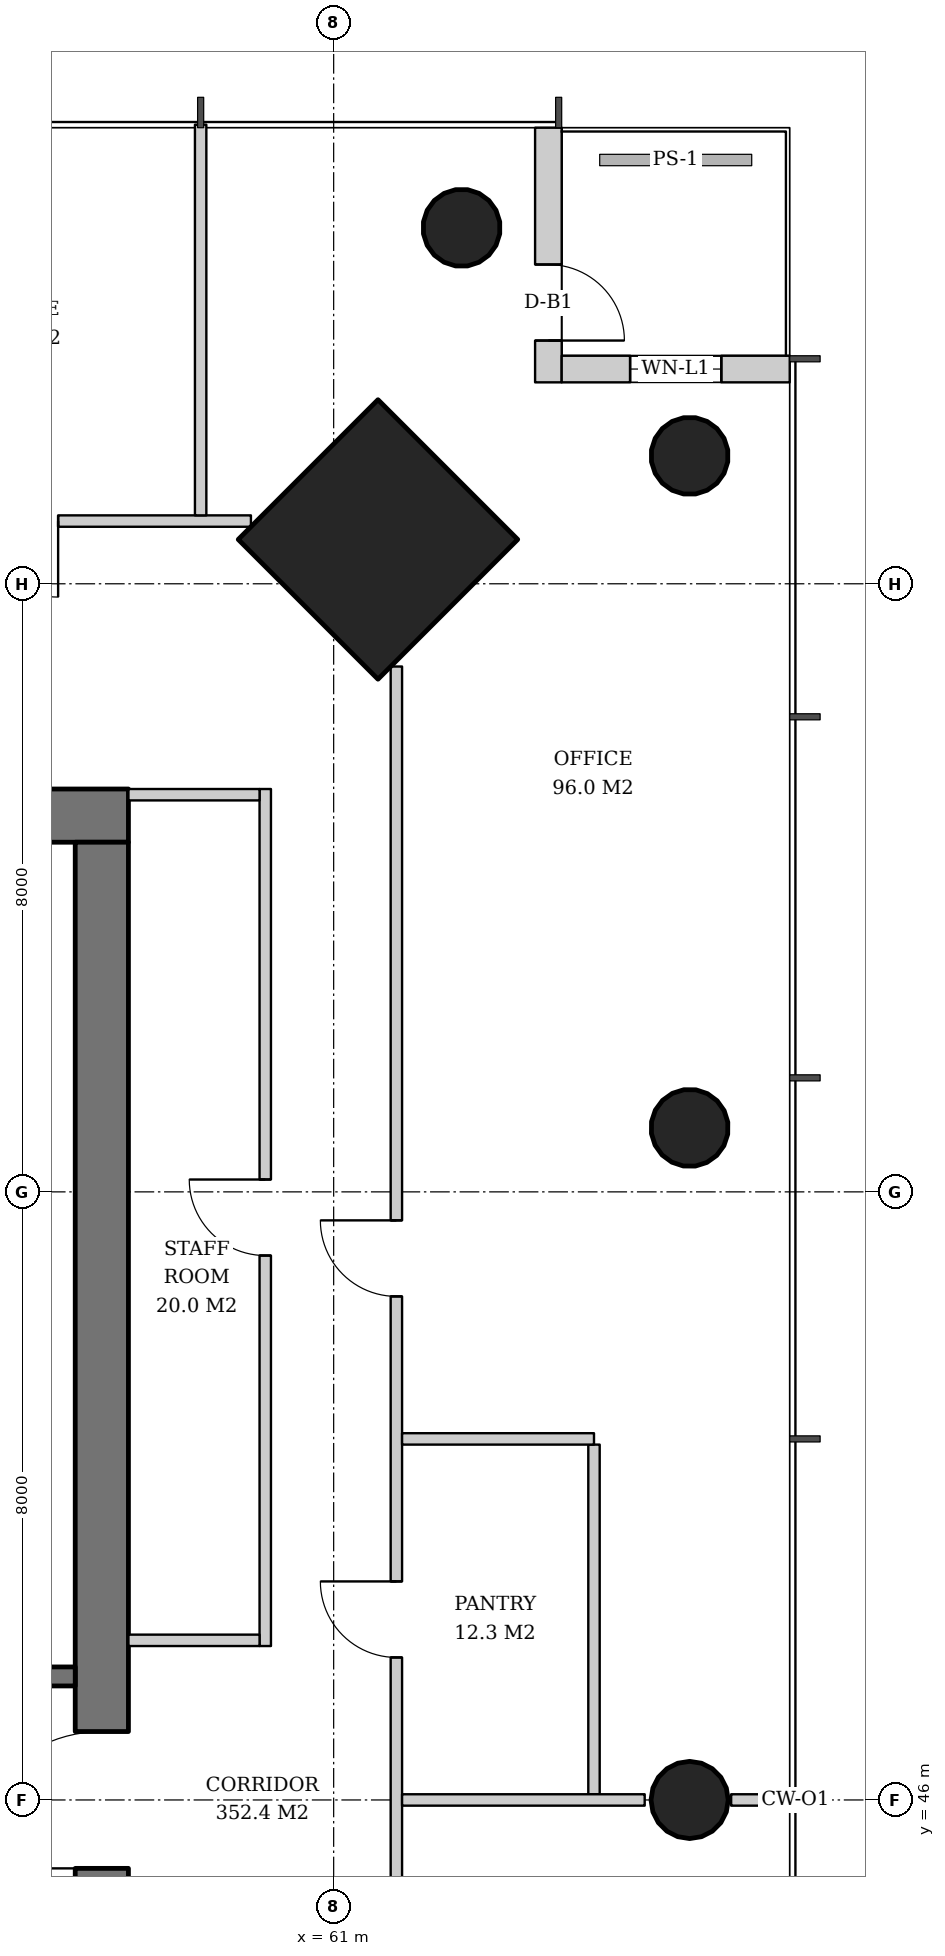
"""IFC4 building model, lengths in metres.
Left out: names, types, materials, properties, quantities, classifications, styles, units other than length and angle.
Written with IfcOpenShell. Run it as: python <this file> out.ifc"""

import sys

from ifc_helpers import new_model, si_unit, direction, frame, frame_2d, origin, origin_2d, place, context, subcontext, project, spatial, rectangle, hollow_circle, extrude, element, fill, save


model = new_model("IFC4")
c1 = context("Model", 3, precision=1e-05, world=origin(), true_north=direction((0.0, 1.0)))
c2 = subcontext(c1, "Body", "Model", "MODEL_VIEW")
j1 = project(units=[si_unit("LENGTHUNIT", "METRE"), si_unit("PLANEANGLEUNIT", "RADIAN")], contexts=[c1])
p1 = place(None, origin())
s1 = spatial("IfcSite", under=j1, at=p1, CompositionType="ELEMENT")
p2 = place(p1, origin())
s2 = spatial("IfcBuilding", under=s1, at=p2, CompositionType="ELEMENT")
p3 = place(p2, frame((0.0, 0.0, 123.6)))
s3 = spatial("IfcBuildingStorey", under=s2, at=p3, CompositionType="ELEMENT", Elevation=123.6)
p4 = place(p3, frame((61.621, 62.621, 0.0), z_axis=(-0.031900153262, -0.031900153262, 0.998981861919), x_axis=(0.707106781187, -0.707106781187, 0.0)))
e1 = element("IfcColumn", 1, at=p4, inside=s3, PredefinedType="COLUMN", context=c2, shape_type="SweptSolid", body=[
    extrude(rectangle(XDim=2.6, YDim=2.6, at=origin_2d()), origin(), (0.0, 0.0, 1.0), 3.804),
])
p5 = place(p3, frame((65.721, 63.721, 0.0), z_axis=(-0.031900153262, -0.031900153262, 0.998981861919), x_axis=(0.707106781187, -0.707106781187, 0.0)))
e2 = element("IfcColumn", 2, at=p5, inside=s3, PredefinedType="COLUMN", context=c2, shape_type="SweptSolid", body=[
    extrude(hollow_circle(Radius=0.508, WallThickness=0.04, at=origin_2d()), origin(), (0.0, 0.0, 1.0), 3.804),
])
p6 = place(p3, frame((65.721, 46.0, 0.0), z_axis=(-0.031916396774, 0.0, 0.999490542035), x_axis=(0.0, -1.0, 0.0)))
e3 = element("IfcColumn", 3, at=p6, inside=s3, PredefinedType="COLUMN", context=c2, shape_type="SweptSolid", body=[
    extrude(hollow_circle(Radius=0.508, WallThickness=0.04, at=origin_2d()), origin(), (0.0, 0.0, 1.0), 3.802),
])
p7 = place(p3, frame((65.721, 54.861, 0.0), z_axis=(-0.031912349901, -0.015924069971, 0.999363810591), x_axis=(0.446493300058, -0.894786976326, 0.0)))
e4 = element("IfcColumn", 4, at=p7, inside=s3, PredefinedType="COLUMN", context=c2, shape_type="SweptSolid", body=[
    extrude(hollow_circle(Radius=0.508, WallThickness=0.04, at=origin_2d()), origin(), (0.0, 0.0, 1.0), 3.802),
])
p8 = place(p3, frame((62.721, 66.721, 0.0), z_axis=(-0.031900153262, -0.031900153262, 0.998981861919), x_axis=(0.707106781187, -0.707106781187, 0.0)))
e5 = element("IfcColumn", 5, at=p8, inside=s3, PredefinedType="COLUMN", context=c2, shape_type="SweptSolid", body=[
    extrude(hollow_circle(Radius=0.508, WallThickness=0.04, at=origin_2d()), origin(), (0.0, 0.0, 1.0), 3.804),
])
p9 = place(p3, frame((31.7, 58.95, 0.0), z_axis=(0.0, 0.0, 1.0), x_axis=(1.0, 0.0, 0.0)))
e6 = element("IfcWall", 6, at=p9, inside=s3, PredefinedType="SHEAR", context=c2, shape_type="SweptSolid", body=[
    extrude(rectangle(XDim=26.6, YDim=0.7, at=frame_2d((13.3, 0.0))), origin(), (0.0, 0.0, 1.0), 3.8),
])
p10 = place(p9, frame((17.94, 0.0, 0.0)))
e7 = element("IfcOpeningElement", 7, at=p10, cuts=e6, PredefinedType="OPENING", context=c2, shape_type="SweptSolid", body=[
    extrude(rectangle(XDim=1.0, YDim=2.1, at=frame_2d((0.5, 1.05))), frame((0.0, 0.36, 0.0), z_axis=(0.0, -1.0, 0.0), x_axis=(1.0, 0.0, 0.0)), (0.0, 0.0, 1.0), 0.72),
])
p11 = place(p9, frame((5.825, 0.0, 0.0)))
e8 = element("IfcOpeningElement", 8, at=p11, cuts=e6, PredefinedType="OPENING", context=c2, shape_type="SweptSolid", body=[
    extrude(rectangle(XDim=1.0, YDim=2.1, at=frame_2d((0.5, 1.05))), frame((0.0, 0.36, 0.0), z_axis=(0.0, -1.0, 0.0), x_axis=(1.0, 0.0, 0.0)), (0.0, 0.0, 1.0), 0.72),
])
p12 = place(p9, frame((1.837, 0.0, 0.0)))
e9 = element("IfcOpeningElement", 9, at=p12, cuts=e6, PredefinedType="OPENING", context=c2, shape_type="SweptSolid", body=[
    extrude(rectangle(XDim=1.0, YDim=2.1, at=frame_2d((0.5, 1.05))), frame((0.0, 0.36, 0.0), z_axis=(0.0, -1.0, 0.0), x_axis=(1.0, 0.0, 0.0)), (0.0, 0.0, 1.0), 0.72),
])
p13 = place(p9, frame((3.781, 0.0, 0.0)))
e10 = element("IfcOpeningElement", 10, at=p13, cuts=e6, PredefinedType="OPENING", context=c2, shape_type="SweptSolid", body=[
    extrude(rectangle(XDim=1.0, YDim=2.1, at=frame_2d((0.5, 1.05))), frame((0.0, 0.36, 0.0), z_axis=(0.0, -1.0, 0.0), x_axis=(1.0, 0.0, 0.0)), (0.0, 0.0, 1.0), 0.72),
])
p14 = place(p9, frame((8.342, 0.0, 0.0)))
e11 = element("IfcOpeningElement", 11, at=p14, cuts=e6, PredefinedType="OPENING", context=c2, shape_type="SweptSolid", body=[
    extrude(rectangle(XDim=1.0, YDim=2.1, at=frame_2d((0.5, 1.05))), frame((0.0, 0.36, 0.0), z_axis=(0.0, -1.0, 0.0), x_axis=(1.0, 0.0, 0.0)), (0.0, 0.0, 1.0), 0.72),
])
p15 = place(p9, frame((11.626, 0.0, 0.0)))
e12 = element("IfcOpeningElement", 12, at=p15, cuts=e6, PredefinedType="OPENING", context=c2, shape_type="SweptSolid", body=[
    extrude(rectangle(XDim=1.0, YDim=2.1, at=frame_2d((0.5, 1.05))), frame((0.0, 0.36, 0.0), z_axis=(0.0, -1.0, 0.0), x_axis=(1.0, 0.0, 0.0)), (0.0, 0.0, 1.0), 0.72),
])
p16 = place(p9, frame((14.862, 0.0, 0.0)))
e13 = element("IfcOpeningElement", 13, at=p16, cuts=e6, PredefinedType="OPENING", context=c2, shape_type="SweptSolid", body=[
    extrude(rectangle(XDim=1.0, YDim=2.1, at=frame_2d((0.5, 1.05))), frame((0.0, 0.36, 0.0), z_axis=(0.0, -1.0, 0.0), x_axis=(1.0, 0.0, 0.0)), (0.0, 0.0, 1.0), 0.72),
])
p17 = place(p9, frame((20.9, 0.0, 0.0)))
e14 = element("IfcOpeningElement", 14, at=p17, cuts=e6, PredefinedType="OPENING", context=c2, shape_type="SweptSolid", body=[
    extrude(rectangle(XDim=1.0, YDim=2.1, at=frame_2d((0.5, 1.05))), frame((0.0, 0.36, 0.0), z_axis=(0.0, -1.0, 0.0), x_axis=(1.0, 0.0, 0.0)), (0.0, 0.0, 1.0), 0.72),
])
p18 = place(p9, frame((23.75, 0.0, 0.0)))
e15 = element("IfcOpeningElement", 15, at=p18, cuts=e6, PredefinedType="OPENING", context=c2, shape_type="SweptSolid", body=[
    extrude(rectangle(XDim=1.0, YDim=2.1, at=frame_2d((0.5, 1.05))), frame((0.0, 0.36, 0.0), z_axis=(0.0, -1.0, 0.0), x_axis=(1.0, 0.0, 0.0)), (0.0, 0.0, 1.0), 0.72),
])
p19 = place(p3, frame((57.95, 33.4, 0.0), z_axis=(0.0, 0.0, 1.0), x_axis=(0.0, 1.0, 0.0)))
e16 = element("IfcWall", 16, at=p19, inside=s3, PredefinedType="SHEAR", context=c2, shape_type="SweptSolid", body=[
    extrude(rectangle(XDim=25.2, YDim=0.7, at=frame_2d((12.6, 0.0))), origin(), (0.0, 0.0, 1.0), 3.8),
])
p20 = place(p19, frame((11.7, 0.0, 0.0)))
e17 = element("IfcOpeningElement", 17, at=p20, cuts=e16, PredefinedType="OPENING", context=c2, shape_type="SweptSolid", body=[
    extrude(rectangle(XDim=1.8, YDim=2.4, at=frame_2d((0.9, 1.2))), frame((0.0, 0.36, 0.0), z_axis=(0.0, -1.0, 0.0), x_axis=(1.0, 0.0, 0.0)), (0.0, 0.0, 1.0), 0.72),
])
p21 = place(p3, frame((63.825, 68.0, 0.0), z_axis=(0.0, 0.0, 1.0), x_axis=(0.0, -1.0, 0.0)))
e18 = element("IfcWall", 18, at=p21, inside=s3, PredefinedType="SOLIDWALL", context=c2, shape_type="SweptSolid", body=[
    extrude(rectangle(XDim=3.35, YDim=0.35, at=frame_2d((1.675, 0.0))), origin(), (0.0, 0.0, 1.0), 3.62),
])
p22 = place(p21, frame((1.8, 0.0, 0.0)))
e19 = element("IfcOpeningElement", 19, at=p22, cuts=e18, PredefinedType="OPENING", context=c2, shape_type="SweptSolid", body=[
    extrude(rectangle(XDim=1.0, YDim=2.4, at=frame_2d((0.5, 1.2))), frame((0.0, 0.185, 0.0), z_axis=(0.0, -1.0, 0.0), x_axis=(1.0, 0.0, 0.0)), (0.0, 0.0, 1.0), 0.37),
])
p23 = place(p3, frame((64.0, 64.825, 0.0), z_axis=(0.0, 0.0, 1.0), x_axis=(1.0, 0.0, 0.0)))
e20 = element("IfcWall", 20, at=p23, inside=s3, PredefinedType="SOLIDWALL", context=c2, shape_type="SweptSolid", body=[
    extrude(rectangle(XDim=3.0, YDim=0.35, at=frame_2d((1.5, 0.0))), origin(), (0.0, 0.0, 1.0), 3.62),
])
p24 = place(p23, frame((0.9, 0.0, 0.6)))
e21 = element("IfcOpeningElement", 21, at=p24, cuts=e20, PredefinedType="OPENING", context=c2, shape_type="SweptSolid", body=[
    extrude(rectangle(XDim=1.2, YDim=2.55, at=frame_2d((0.6, 1.275))), frame((0.0, 0.185, 0.0), z_axis=(0.0, -1.0, 0.0), x_axis=(1.0, 0.0, 0.0)), (0.0, 0.0, 1.0), 0.37),
])
p25 = place(p3, frame((54.9, 47.625, 0.0), z_axis=(0.0, 0.0, 1.0), x_axis=(1.0, 0.0, 0.0)))
e22 = element("IfcWall", 22, at=p25, inside=s3, PredefinedType="SOLIDWALL", context=c2, shape_type="SweptSolid", body=[
    extrude(rectangle(XDim=2.7, YDim=0.25, at=frame_2d((1.35, 0.0))), origin(), (0.0, 0.0, 1.0), 3.62),
])
p26 = place(p3, frame((60.1, 48.025, 0.0), z_axis=(0.0, 0.0, 1.0), x_axis=(0.0, 1.0, 0.0)))
e23 = element("IfcWall", 23, at=p26, inside=s3, PredefinedType="PARTITIONING", context=c2, shape_type="SweptSolid", body=[
    extrude(rectangle(XDim=11.275, YDim=0.15, at=frame_2d((5.638, 0.0))), origin(), (0.0, 0.0, 1.0), 2.806),
])
p27 = place(p26, frame((5.137, 0.0, 0.0)))
e24 = element("IfcOpeningElement", 24, at=p27, cuts=e23, PredefinedType="OPENING", context=c2, shape_type="SweptSolid", body=[
    extrude(rectangle(XDim=1.0, YDim=2.1, at=frame_2d((0.5, 1.05))), frame((0.0, 0.085, 0.0), z_axis=(0.0, -1.0, 0.0), x_axis=(1.0, 0.0, 0.0)), (0.0, 0.0, 1.0), 0.17),
])
for number, where, z_axis, x_axis in (
    (25, (58.3, 48.1, 0.0), (0.0, 0.0, 1.0), (1.0, 0.0, 0.0)),
    (26, (58.3, 59.225, 0.0), (0.0, 0.0, 1.0), (1.0, 0.0, 0.0)),
):
    element("IfcWall", number, at=place(p3, frame(where, z_axis=z_axis, x_axis=x_axis)), inside=s3, PredefinedType="PARTITIONING", context=c2, shape_type="SweptSolid", body=[
        extrude(rectangle(XDim=1.725, YDim=0.15, at=frame_2d((0.862, 0.0))), origin(), (0.0, 0.0, 1.0), 3.62),
    ])
p28 = place(p3, frame((64.425, 46.075, 0.0), z_axis=(0.0, 0.0, 1.0), x_axis=(0.0, 1.0, 0.0)))
e27 = element("IfcWall", 27, at=p28, inside=s3, PredefinedType="PARTITIONING", context=c2, shape_type="SweptSolid", body=[
    extrude(rectangle(XDim=4.6, YDim=0.15, at=frame_2d((2.3, 0.0))), origin(), (0.0, 0.0, 1.0), 2.858),
])
p29 = place(p3, frame((61.825, 31.088, 0.0), z_axis=(0.0, 0.0, 1.0), x_axis=(0.0, 1.0, 0.0)))
e28 = element("IfcWall", 28, at=p29, inside=s3, PredefinedType="PARTITIONING", context=c2, shape_type="SweptSolid", body=[
    extrude(rectangle(XDim=29.823, YDim=0.15, at=frame_2d((14.912, 0.0))), origin(), (0.0, 0.0, 1.0), 2.72),
])
p30 = place(p29, frame((2.537, 0.0, 0.0)))
e29 = element("IfcOpeningElement", 29, at=p30, cuts=e28, PredefinedType="OPENING", context=c2, shape_type="SweptSolid", body=[
    extrude(rectangle(XDim=1.0, YDim=2.1, at=frame_2d((0.5, 1.05))), frame((0.0, 0.085, 0.0), z_axis=(0.0, -1.0, 0.0), x_axis=(1.0, 0.0, 0.0)), (0.0, 0.0, 1.0), 0.17),
])
p31 = place(p29, frame((7.287, 0.0, 0.0)))
e30 = element("IfcOpeningElement", 30, at=p31, cuts=e28, PredefinedType="OPENING", context=c2, shape_type="SweptSolid", body=[
    extrude(rectangle(XDim=1.0, YDim=2.1, at=frame_2d((0.5, 1.05))), frame((0.0, 0.085, 0.0), z_axis=(0.0, -1.0, 0.0), x_axis=(1.0, 0.0, 0.0)), (0.0, 0.0, 1.0), 0.17),
])
p32 = place(p29, frame((12.037, 0.0, 0.0)))
e31 = element("IfcOpeningElement", 31, at=p32, cuts=e28, PredefinedType="OPENING", context=c2, shape_type="SweptSolid", body=[
    extrude(rectangle(XDim=1.0, YDim=2.1, at=frame_2d((0.5, 1.05))), frame((0.0, 0.085, 0.0), z_axis=(0.0, -1.0, 0.0), x_axis=(1.0, 0.0, 0.0)), (0.0, 0.0, 1.0), 0.17),
])
p33 = place(p29, frame((16.787, 0.0, 0.0)))
e32 = element("IfcOpeningElement", 32, at=p33, cuts=e28, PredefinedType="OPENING", context=c2, shape_type="SweptSolid", body=[
    extrude(rectangle(XDim=1.0, YDim=2.1, at=frame_2d((0.5, 1.05))), frame((0.0, 0.085, 0.0), z_axis=(0.0, -1.0, 0.0), x_axis=(1.0, 0.0, 0.0)), (0.0, 0.0, 1.0), 0.17),
])
p34 = place(p29, frame((21.537, 0.0, 0.0)))
e33 = element("IfcOpeningElement", 33, at=p34, cuts=e28, PredefinedType="OPENING", context=c2, shape_type="SweptSolid", body=[
    extrude(rectangle(XDim=1.0, YDim=2.1, at=frame_2d((0.5, 1.05))), frame((0.0, 0.085, 0.0), z_axis=(0.0, -1.0, 0.0), x_axis=(1.0, 0.0, 0.0)), (0.0, 0.0, 1.0), 0.17),
])
p35 = place(p3, frame((61.9, 46.0, 0.0), z_axis=(0.0, 0.0, 1.0), x_axis=(1.0, 0.0, 0.0)))
e34 = element("IfcWall", 34, at=p35, inside=s3, PredefinedType="PARTITIONING", context=c2, shape_type="SweptSolid", body=[
    extrude(rectangle(XDim=3.192, YDim=0.15, at=frame_2d((1.596, 0.0))), origin(), (0.0, 0.0, 1.0), 2.67),
])
p36 = place(p3, frame((66.229, 46.0, 0.0), z_axis=(0.0, 0.0, 1.0), x_axis=(1.0, 0.0, 0.0)))
e35 = element("IfcWall", 35, at=p36, inside=s3, PredefinedType="PARTITIONING", context=c2, shape_type="SweptSolid", body=[
    extrude(rectangle(XDim=0.811, YDim=0.15, at=frame_2d((0.405, 0.0))), origin(), (0.0, 0.0, 1.0), 2.67),
])
p37 = place(p3, frame((61.9, 50.75, 0.0), z_axis=(0.0, 0.0, 1.0), x_axis=(1.0, 0.0, 0.0)))
e36 = element("IfcWall", 36, at=p37, inside=s3, PredefinedType="PARTITIONING", context=c2, shape_type="SweptSolid", body=[
    extrude(rectangle(XDim=2.525, YDim=0.15, at=frame_2d((1.263, 0.0))), origin(), (0.0, 0.0, 1.0), 3.62),
])
p38 = place(p3, frame((59.912, 62.825, 0.0), z_axis=(0.0, 0.0, 1.0), x_axis=(-1.0, 0.0, 0.0)))
e37 = element("IfcWall", 37, at=p38, inside=s3, PredefinedType="PARTITIONING", context=c2, shape_type="SweptSolid", body=[
    extrude(rectangle(XDim=29.823, YDim=0.15, at=frame_2d((14.912, 0.0))), origin(), (0.0, 0.0, 1.0), 2.72),
])
p39 = place(p38, frame((2.537, 0.0, 0.0)))
e38 = element("IfcOpeningElement", 38, at=p39, cuts=e37, PredefinedType="OPENING", context=c2, shape_type="SweptSolid", body=[
    extrude(rectangle(XDim=1.0, YDim=2.1, at=frame_2d((0.5, 1.05))), frame((0.0, 0.085, 0.0), z_axis=(0.0, -1.0, 0.0), x_axis=(1.0, 0.0, 0.0)), (0.0, 0.0, 1.0), 0.17),
])
p40 = place(p38, frame((7.287, 0.0, 0.0)))
e39 = element("IfcOpeningElement", 39, at=p40, cuts=e37, PredefinedType="OPENING", context=c2, shape_type="SweptSolid", body=[
    extrude(rectangle(XDim=1.0, YDim=2.1, at=frame_2d((0.5, 1.05))), frame((0.0, 0.085, 0.0), z_axis=(0.0, -1.0, 0.0), x_axis=(1.0, 0.0, 0.0)), (0.0, 0.0, 1.0), 0.17),
])
p41 = place(p38, frame((12.037, 0.0, 0.0)))
e40 = element("IfcOpeningElement", 40, at=p41, cuts=e37, PredefinedType="OPENING", context=c2, shape_type="SweptSolid", body=[
    extrude(rectangle(XDim=1.0, YDim=2.1, at=frame_2d((0.5, 1.05))), frame((0.0, 0.085, 0.0), z_axis=(0.0, -1.0, 0.0), x_axis=(1.0, 0.0, 0.0)), (0.0, 0.0, 1.0), 0.17),
])
p42 = place(p38, frame((21.537, 0.0, 0.0)))
e41 = element("IfcOpeningElement", 41, at=p42, cuts=e37, PredefinedType="OPENING", context=c2, shape_type="SweptSolid", body=[
    extrude(rectangle(XDim=1.0, YDim=2.1, at=frame_2d((0.5, 1.05))), frame((0.0, 0.085, 0.0), z_axis=(0.0, -1.0, 0.0), x_axis=(1.0, 0.0, 0.0)), (0.0, 0.0, 1.0), 0.17),
])
p43 = place(p3, frame((59.25, 62.9, 0.0), z_axis=(0.0, 0.0, 1.0), x_axis=(0.0, 1.0, 0.0)))
e42 = element("IfcWall", 42, at=p43, inside=s3, PredefinedType="PARTITIONING", context=c2, shape_type="SweptSolid", body=[
    extrude(rectangle(XDim=5.14, YDim=0.15, at=frame_2d((2.57, 0.0))), origin(), (0.0, 0.0, 1.0), 2.82),
])
p44 = place(p22, origin())
e43 = element("IfcDoor", 43, at=p44, inside=s3, OperationType="SINGLE_SWING_RIGHT", PredefinedType="DOOR", context=c2, shape_type="SweptSolid", body=[
    extrude(rectangle(XDim=1.0, YDim=2.4, at=frame_2d((0.5, 1.2))), frame((0.0, 0.025, 0.0), z_axis=(0.0, -1.0, 0.0), x_axis=(1.0, 0.0, 0.0)), (0.0, 0.0, 1.0), 0.05),
])
fill(e19, e43)
p45 = place(p24, origin())
e44 = element("IfcWindow", 44, at=p45, inside=s3, PartitioningType="SINGLE_PANEL", PredefinedType="WINDOW", context=c2, shape_type="SweptSolid", body=[
    extrude(rectangle(XDim=1.2, YDim=2.55, at=frame_2d((0.6, 1.275))), frame((0.0, 0.03, 0.0), z_axis=(0.0, -1.0, 0.0), x_axis=(1.0, 0.0, 0.0)), (0.0, 0.0, 1.0), 0.06),
])
fill(e21, e44)
p46 = place(p20, origin())
e45 = element("IfcDoor", 45, at=p46, inside=s3, OperationType="DOUBLE_DOOR_SINGLE_SWING", PredefinedType="DOOR", context=c2, shape_type="SweptSolid", body=[
    extrude(rectangle(XDim=1.8, YDim=2.4, at=frame_2d((0.9, 1.2))), frame((0.0, 0.025, 0.0), z_axis=(0.0, -1.0, 0.0), x_axis=(1.0, 0.0, 0.0)), (0.0, 0.0, 1.0), 0.05),
])
fill(e17, e45)
p47 = place(p27, origin())
e46 = element("IfcDoor", 46, at=p47, inside=s3, OperationType="SINGLE_SWING_RIGHT", PredefinedType="DOOR", context=c2, shape_type="SweptSolid", body=[
    extrude(rectangle(XDim=1.0, YDim=2.1, at=frame_2d((0.5, 1.05))), frame((0.0, 0.025, 0.0), z_axis=(0.0, -1.0, 0.0), x_axis=(1.0, 0.0, 0.0)), (0.0, 0.0, 1.0), 0.05),
])
fill(e24, e46)
p48 = place(p33, origin())
e47 = element("IfcDoor", 47, at=p48, inside=s3, OperationType="SINGLE_SWING_RIGHT", PredefinedType="DOOR", context=c2, shape_type="SweptSolid", body=[
    extrude(rectangle(XDim=1.0, YDim=2.1, at=frame_2d((0.5, 1.05))), frame((0.0, 0.025, 0.0), z_axis=(0.0, -1.0, 0.0), x_axis=(1.0, 0.0, 0.0)), (0.0, 0.0, 1.0), 0.05),
])
fill(e32, e47)
p49 = place(p34, origin())
e48 = element("IfcDoor", 48, at=p49, inside=s3, OperationType="SINGLE_SWING_RIGHT", PredefinedType="DOOR", context=c2, shape_type="SweptSolid", body=[
    extrude(rectangle(XDim=1.0, YDim=2.1, at=frame_2d((0.5, 1.05))), frame((0.0, 0.025, 0.0), z_axis=(0.0, -1.0, 0.0), x_axis=(1.0, 0.0, 0.0)), (0.0, 0.0, 1.0), 0.05),
])
fill(e33, e48)
p50 = place(p39, origin())
e49 = element("IfcDoor", 49, at=p50, inside=s3, OperationType="SINGLE_SWING_LEFT", PredefinedType="DOOR", context=c2, shape_type="SweptSolid", body=[
    extrude(rectangle(XDim=1.0, YDim=2.1, at=frame_2d((0.5, 1.05))), frame((0.0, 0.025, 0.0), z_axis=(0.0, -1.0, 0.0), x_axis=(1.0, 0.0, 0.0)), (0.0, 0.0, 1.0), 0.05),
])
fill(e38, e49)
save(model, sys.argv[1])
